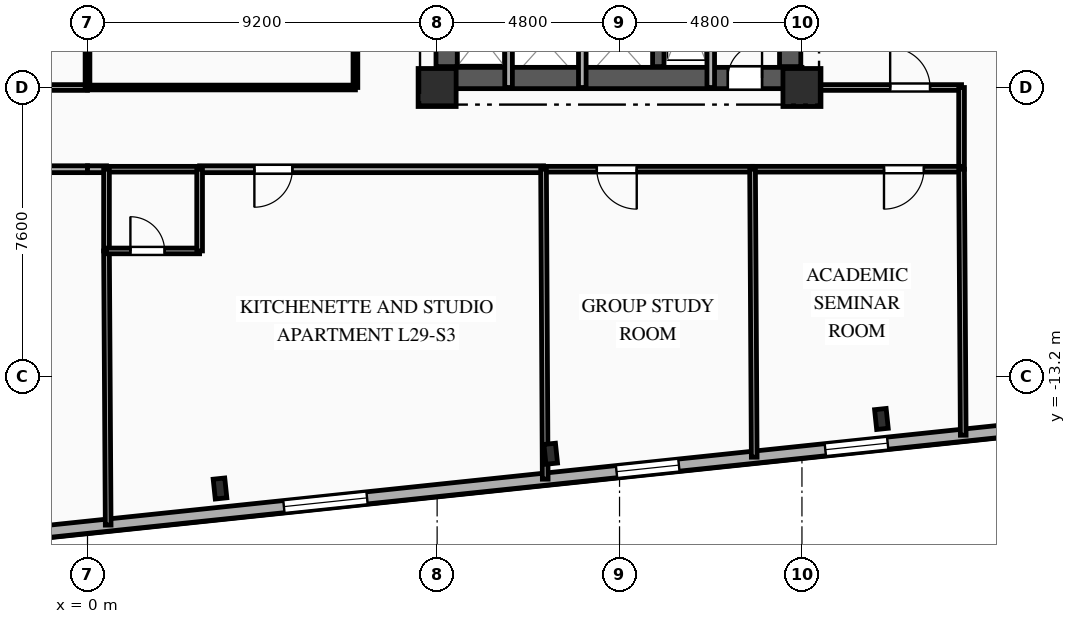
"""IFC4 building model, lengths in metres.
Left out: names, types, materials, properties, quantities, classifications, styles, units other than length and angle.
Written with IfcOpenShell. Run it as: python <this file> out.ifc"""

import sys

from ifc_helpers import new_model, si_unit, direction, frame, frame_2d, origin, origin_2d, place, context, subcontext, project, spatial, rectangle, i_section, extrude, element, fill, save


model = new_model("IFC4")
c1 = context("Model", 3, precision=1e-05, world=origin(), true_north=direction((0.0, 1.0)))
c2 = subcontext(c1, "Body", "Model", "MODEL_VIEW")
j1 = project(units=[si_unit("LENGTHUNIT", "METRE"), si_unit("PLANEANGLEUNIT", "RADIAN")], contexts=[c1])
p1 = place(None, origin())
s1 = spatial("IfcSite", under=j1, at=p1, CompositionType="ELEMENT")
p2 = place(p1, origin())
s2 = spatial("IfcBuilding", under=s1, at=p2, CompositionType="ELEMENT")
p3 = place(p2, frame((0.0, 0.0, 105.8)))
s3 = spatial("IfcBuildingStorey", under=s2, at=p3, CompositionType="ELEMENT", Elevation=105.8)
for number, where, z_axis, x_axis in (
    (1, (9.2, -5.6, 0.0), (0.0, 0.0, 1.0), (1.0, 0.0, 0.0)),
    (2, (18.8, -5.6, 0.0), (0.0, 0.0, 1.0), (1.0, 0.0, 0.0)),
):
    element("IfcColumn", number, at=place(p3, frame(where, z_axis=z_axis, x_axis=x_axis)), inside=s3, PredefinedType="COLUMN", context=c2, shape_type="SweptSolid", body=[
        extrude(rectangle(XDim=1.0, YDim=1.0, at=origin_2d()), origin(), (0.0, 0.0, 1.0), 3.35),
    ])
for number, where, z_axis, x_axis in (
    (3, (3.487, -16.151, 0.0), (0.0, 0.0, 1.0), (0.995, 0.105, 0.0)),
    (4, (12.189, -15.237, 0.0), (0.0, 0.0, 1.0), (0.995, 0.105, 0.0)),
    (5, (20.891, -14.322, 0.0), (0.0, 0.0, 1.0), (0.995, 0.105, 0.0)),
):
    element("IfcColumn", number, at=place(p3, frame(where, z_axis=z_axis, x_axis=x_axis)), inside=s3, PredefinedType="COLUMN", context=c2, shape_type="SweptSolid", body=[
        extrude(i_section(OverallWidth=0.306, OverallDepth=0.524, WebThickness=0.021, FlangeThickness=0.04, FilletRadius=0.027, at=origin_2d()), origin(), (0.0, 0.0, 1.0), 3.35),
    ])
p4 = place(p3, frame((30.307, -13.986, 0.0), z_axis=(0.0, 0.0, 1.0), x_axis=(-0.994521628355, -0.104531003701, 0.0)))
e6 = element("IfcWall", 6, at=p4, inside=s3, PredefinedType="SOLIDWALL", context=c2, shape_type="SweptSolid", body=[
    extrude(rectangle(XDim=53.8, YDim=0.32, at=frame_2d((26.9, 0.0))), origin(), (0.0, 0.0, 1.0), 3.045),
])
p5 = place(p4, frame((3.098, 0.0, 0.85)))
e7 = element("IfcOpeningElement", 7, at=p5, cuts=e6, PredefinedType="OPENING", context=c2, shape_type="SweptSolid", body=[
    extrude(rectangle(XDim=1.65, YDim=1.85, at=frame_2d((0.825, 0.925))), frame((0.0, 0.17, 0.0), z_axis=(0.0, -1.0, 0.0), x_axis=(1.0, 0.0, 0.0)), (0.0, 0.0, 1.0), 0.34),
])
p6 = place(p4, frame((9.302, 0.0, 0.85)))
e8 = element("IfcOpeningElement", 8, at=p6, cuts=e6, PredefinedType="OPENING", context=c2, shape_type="SweptSolid", body=[
    extrude(rectangle(XDim=1.65, YDim=1.85, at=frame_2d((0.825, 0.925))), frame((0.0, 0.17, 0.0), z_axis=(0.0, -1.0, 0.0), x_axis=(1.0, 0.0, 0.0)), (0.0, 0.0, 1.0), 0.34),
])
p7 = place(p4, frame((14.827, 0.0, 0.85)))
e9 = element("IfcOpeningElement", 9, at=p7, cuts=e6, PredefinedType="OPENING", context=c2, shape_type="SweptSolid", body=[
    extrude(rectangle(XDim=1.65, YDim=1.85, at=frame_2d((0.825, 0.925))), frame((0.0, 0.17, 0.0), z_axis=(0.0, -1.0, 0.0), x_axis=(1.0, 0.0, 0.0)), (0.0, 0.0, 1.0), 0.34),
])
p8 = place(p4, frame((23.078, 0.0, 0.85)))
e10 = element("IfcOpeningElement", 10, at=p8, cuts=e6, PredefinedType="OPENING", context=c2, shape_type="SweptSolid", body=[
    extrude(rectangle(XDim=2.2, YDim=1.85, at=frame_2d((1.1, 0.925))), frame((0.0, 0.17, 0.0), z_axis=(0.0, -1.0, 0.0), x_axis=(1.0, 0.0, 0.0)), (0.0, 0.0, 1.0), 0.34),
])
p9 = place(p4, frame((34.646, 0.0, 0.85)))
e11 = element("IfcOpeningElement", 11, at=p9, cuts=e6, PredefinedType="OPENING", context=c2, shape_type="SweptSolid", body=[
    extrude(rectangle(XDim=2.2, YDim=1.85, at=frame_2d((1.1, 0.925))), frame((0.0, 0.17, 0.0), z_axis=(0.0, -1.0, 0.0), x_axis=(1.0, 0.0, 0.0)), (0.0, 0.0, 1.0), 0.34),
])
p10 = place(p4, frame((43.728, 0.0, 0.85)))
e12 = element("IfcOpeningElement", 12, at=p10, cuts=e6, PredefinedType="OPENING", context=c2, shape_type="SweptSolid", body=[
    extrude(rectangle(XDim=1.65, YDim=1.85, at=frame_2d((0.825, 0.925))), frame((0.0, 0.17, 0.0), z_axis=(0.0, -1.0, 0.0), x_axis=(1.0, 0.0, 0.0)), (0.0, 0.0, 1.0), 0.34),
])
p11 = place(p4, frame((49.653, 0.0, 0.85)))
e13 = element("IfcOpeningElement", 13, at=p11, cuts=e6, PredefinedType="OPENING", context=c2, shape_type="SweptSolid", body=[
    extrude(rectangle(XDim=1.65, YDim=1.85, at=frame_2d((0.825, 0.925))), frame((0.0, 0.17, 0.0), z_axis=(0.0, -1.0, 0.0), x_axis=(1.0, 0.0, 0.0)), (0.0, 0.0, 1.0), 0.34),
])
p12 = place(p3, frame((9.2, -5.35, 0.0), z_axis=(0.0, 0.0, 1.0), x_axis=(1.0, 0.0, 0.0)))
e14 = element("IfcWall", 14, at=p12, inside=s3, PredefinedType="SHEAR", context=c2, shape_type="SweptSolid", body=[
    extrude(rectangle(XDim=9.6, YDim=0.56, at=frame_2d((4.8, 0.0))), origin(), (0.0, 0.0, 1.0), 3.045),
])
p13 = place(p12, frame((7.65, 0.0, 0.0)))
e15 = element("IfcOpeningElement", 15, at=p13, cuts=e14, PredefinedType="OPENING", context=c2, shape_type="SweptSolid", body=[
    extrude(rectangle(XDim=0.9, YDim=2.1, at=frame_2d((0.45, 1.05))), frame((0.0, 0.29, 0.0), z_axis=(0.0, -1.0, 0.0), x_axis=(1.0, 0.0, 0.0)), (0.0, 0.0, 1.0), 0.58),
])
p14 = place(p3, frame((9.45, -5.05, 0.0), z_axis=(0.0, 0.0, 1.0), x_axis=(0.0, 1.0, 0.0)))
e16 = element("IfcWall", 16, at=p14, inside=s3, PredefinedType="SHEAR", context=c2, shape_type="SweptSolid", body=[
    extrude(rectangle(XDim=10.1, YDim=0.56, at=frame_2d((5.05, 0.0))), origin(), (0.0, 0.0, 1.0), 3.045),
])
p15 = place(p14, frame((7.15, 0.0, 0.0)))
e17 = element("IfcOpeningElement", 17, at=p15, cuts=e16, PredefinedType="OPENING", context=c2, shape_type="SweptSolid", body=[
    extrude(rectangle(XDim=0.9, YDim=2.1, at=frame_2d((0.45, 1.05))), frame((0.0, 0.29, 0.0), z_axis=(0.0, -1.0, 0.0), x_axis=(1.0, 0.0, 0.0)), (0.0, 0.0, 1.0), 0.58),
])
p16 = place(p14, frame((2.4, 0.0, 0.0)))
e18 = element("IfcOpeningElement", 18, at=p16, cuts=e16, PredefinedType="OPENING", context=c2, shape_type="SweptSolid", body=[
    extrude(rectangle(XDim=1.2, YDim=2.15, at=frame_2d((0.6, 1.075))), frame((0.0, 0.29, 0.0), z_axis=(0.0, -1.0, 0.0), x_axis=(1.0, 0.0, 0.0)), (0.0, 0.0, 1.0), 0.58),
])
p17 = place(p3, frame((18.49, -5.05, 0.0), z_axis=(0.0, 0.0, 1.0), x_axis=(0.0, 1.0, 0.0)))
e19 = element("IfcWall", 19, at=p17, inside=s3, PredefinedType="SHEAR", context=c2, shape_type="SweptSolid", body=[
    extrude(rectangle(XDim=10.1, YDim=0.56, at=frame_2d((5.05, 0.0))), origin(), (0.0, 0.0, 1.0), 3.045),
])
p18 = place(p3, frame((15.02, -5.05, 0.0), z_axis=(0.0, 0.0, 1.0), x_axis=(0.0, 1.0, 0.0)))
e20 = element("IfcWall", 20, at=p18, inside=s3, PredefinedType="SHEAR", context=c2, shape_type="SweptSolid", body=[
    extrude(rectangle(XDim=10.1, YDim=0.3, at=frame_2d((5.05, 0.0))), origin(), (0.0, 0.0, 1.0), 3.045),
])
p19 = place(p3, frame((16.4, -2.11, 0.0), z_axis=(0.0, 0.0, 1.0), x_axis=(0.0, -1.0, 0.0)))
e21 = element("IfcWall", 21, at=p19, inside=s3, PredefinedType="PARTITIONING", context=c2, shape_type="SweptSolid", body=[
    extrude(rectangle(XDim=3.49, YDim=0.2, at=frame_2d((1.745, 0.0))), origin(), (0.0, 0.0, 1.0), 3.045),
])
for number, where, z_axis, x_axis in (
    (22, (11.08, -5.6, 0.0), (0.0, 0.0, 1.0), (0.0, 1.0, 0.0)),
    (23, (13.02, -5.6, 0.0), (0.0, 0.0, 1.0), (0.0, 1.0, 0.0)),
):
    element("IfcWall", number, at=place(p3, frame(where, z_axis=z_axis, x_axis=x_axis)), inside=s3, PredefinedType="PARTITIONING", context=c2, shape_type="SweptSolid", body=[
        extrude(rectangle(XDim=2.25, YDim=0.2, at=frame_2d((1.125, 0.0))), origin(), (0.0, 0.0, 1.0), 3.045),
    ])
p20 = place(p3, frame((0.0, -7.75, 0.0), z_axis=(0.0, 0.0, 1.0), x_axis=(-1.0, 0.0, 0.0)))
e24 = element("IfcWall", 24, at=p20, inside=s3, PredefinedType="PARTITIONING", context=c2, shape_type="SweptSolid", body=[
    extrude(rectangle(XDim=8.55, YDim=0.18, at=frame_2d((4.275, 0.0))), origin(), (0.0, 0.0, 1.0), 3.045),
])
p21 = place(p20, frame((1.379, 0.0, 0.0)))
e25 = element("IfcOpeningElement", 25, at=p21, cuts=e24, PredefinedType="OPENING", context=c2, shape_type="SweptSolid", body=[
    extrude(rectangle(XDim=1.0, YDim=2.15, at=frame_2d((0.5, 1.075))), frame((0.0, 0.1, 0.0), z_axis=(0.0, -1.0, 0.0), x_axis=(1.0, 0.0, 0.0)), (0.0, 0.0, 1.0), 0.2),
])
p22 = place(p3, frame((-7.05, -5.6, 0.0), z_axis=(0.0, 0.0, 1.0), x_axis=(1.0, 0.0, 0.0)))
e26 = element("IfcWall", 26, at=p22, inside=s3, PredefinedType="PARTITIONING", context=c2, shape_type="SweptSolid", body=[
    extrude(rectangle(XDim=7.05, YDim=0.15, at=frame_2d((3.525, 0.0))), origin(), (0.0, 0.0, 1.0), 2.53),
])
p23 = place(p3, frame((18.8, -5.6, 0.0), z_axis=(0.0, 0.0, 1.0), x_axis=(1.0, 0.0, 0.0)))
e27 = element("IfcWall", 27, at=p23, inside=s3, PredefinedType="PARTITIONING", context=c2, shape_type="SweptSolid", body=[
    extrude(rectangle(XDim=4.2, YDim=0.15, at=frame_2d((2.1, 0.0))), origin(), (0.0, 0.0, 1.0), 2.53),
])
p24 = place(p23, frame((2.321, 0.0, 0.0)))
e28 = element("IfcOpeningElement", 28, at=p24, cuts=e27, PredefinedType="OPENING", context=c2, shape_type="SweptSolid", body=[
    extrude(rectangle(XDim=1.05, YDim=2.15, at=frame_2d((0.525, 1.075))), frame((0.0, 0.085, 0.0), z_axis=(0.0, -1.0, 0.0), x_axis=(1.0, 0.0, 0.0)), (0.0, 0.0, 1.0), 0.17),
])
p25 = place(p3, frame((23.0, -5.6, 0.0), z_axis=(0.0, 0.0, 1.0), x_axis=(0.0, -1.0, 0.0)))
e29 = element("IfcWall", 29, at=p25, inside=s3, PredefinedType="PARTITIONING", context=c2, shape_type="SweptSolid", body=[
    extrude(rectangle(XDim=2.15, YDim=0.15, at=frame_2d((1.075, 0.0))), origin(), (0.0, 0.0, 1.0), 3.045),
])
p26 = place(p3, frame((0.5, -7.75, 0.0), z_axis=(0.0, 0.0, 1.0), x_axis=(-1.0, 0.0, 0.0)))
e30 = element("IfcWall", 30, at=p26, inside=s3, PredefinedType="PARTITIONING", context=c2, shape_type="SweptSolid", body=[
    extrude(rectangle(XDim=0.5, YDim=0.18, at=frame_2d((0.25, 0.0))), origin(), (0.0, 0.0, 1.0), 3.045),
])
p27 = place(p3, frame((12.0, -7.75, 0.0), z_axis=(0.0, 0.0, 1.0), x_axis=(-1.0, 0.0, 0.0)))
e31 = element("IfcWall", 31, at=p27, inside=s3, PredefinedType="PARTITIONING", context=c2, shape_type="SweptSolid", body=[
    extrude(rectangle(XDim=9.05, YDim=0.18, at=frame_2d((4.525, 0.0))), origin(), (0.0, 0.0, 1.0), 3.045),
])
p28 = place(p27, frame((6.609, 0.0, 0.0)))
e32 = element("IfcOpeningElement", 32, at=p28, cuts=e31, PredefinedType="OPENING", context=c2, shape_type="SweptSolid", body=[
    extrude(rectangle(XDim=1.0, YDim=2.15, at=frame_2d((0.5, 1.075))), frame((0.0, 0.1, 0.0), z_axis=(0.0, -1.0, 0.0), x_axis=(1.0, 0.0, 0.0)), (0.0, 0.0, 1.0), 0.2),
])
p29 = place(p3, frame((2.95, -7.75, 0.0), z_axis=(0.0, 0.0, 1.0), x_axis=(-1.0, 0.0, 0.0)))
e33 = element("IfcWall", 33, at=p29, inside=s3, PredefinedType="PLUMBINGWALL", context=c2, shape_type="SweptSolid", body=[
    extrude(rectangle(XDim=2.45, YDim=0.15, at=frame_2d((1.225, 0.0))), origin(), (0.0, 0.0, 1.0), 3.045),
])
p30 = place(p3, frame((17.5, -7.75, 0.0), z_axis=(0.0, 0.0, 1.0), x_axis=(-1.0, 0.0, 0.0)))
e34 = element("IfcWall", 34, at=p30, inside=s3, PredefinedType="PARTITIONING", context=c2, shape_type="SweptSolid", body=[
    extrude(rectangle(XDim=5.5, YDim=0.15, at=frame_2d((2.75, 0.0))), origin(), (0.0, 0.0, 1.0), 3.045),
])
p31 = place(p30, frame((3.048, 0.0, 0.0)))
e35 = element("IfcOpeningElement", 35, at=p31, cuts=e34, PredefinedType="OPENING", context=c2, shape_type="SweptSolid", body=[
    extrude(rectangle(XDim=1.05, YDim=2.15, at=frame_2d((0.525, 1.075))), frame((0.0, 0.085, 0.0), z_axis=(0.0, -1.0, 0.0), x_axis=(1.0, 0.0, 0.0)), (0.0, 0.0, 1.0), 0.17),
])
p32 = place(p3, frame((23.0, -7.75, 0.0), z_axis=(0.0, 0.0, 1.0), x_axis=(-1.0, 0.0, 0.0)))
e36 = element("IfcWall", 36, at=p32, inside=s3, PredefinedType="PARTITIONING", context=c2, shape_type="SweptSolid", body=[
    extrude(rectangle(XDim=5.5, YDim=0.15, at=frame_2d((2.75, 0.0))), origin(), (0.0, 0.0, 1.0), 3.045),
])
p33 = place(p32, frame((0.991, 0.0, 0.0)))
e37 = element("IfcOpeningElement", 37, at=p33, cuts=e36, PredefinedType="OPENING", context=c2, shape_type="SweptSolid", body=[
    extrude(rectangle(XDim=1.05, YDim=2.15, at=frame_2d((0.525, 1.075))), frame((0.0, 0.085, 0.0), z_axis=(0.0, -1.0, 0.0), x_axis=(1.0, 0.0, 0.0)), (0.0, 0.0, 1.0), 0.17),
])
p34 = place(p3, frame((0.0, -5.6, 0.0), z_axis=(0.0, 0.0, 1.0), x_axis=(1.0, 0.0, 0.0)))
e38 = element("IfcWall", 38, at=p34, inside=s3, PredefinedType="PARTITIONING", context=c2, shape_type="SweptSolid", body=[
    extrude(rectangle(XDim=7.05, YDim=0.125, at=frame_2d((3.525, 0.0))), origin(), (0.0, 0.0, 1.0), 2.53),
])
p35 = place(p3, frame((7.05, -5.6, 0.0), z_axis=(0.0, 0.0, 1.0), x_axis=(0.0, 1.0, 0.0)))
e39 = element("IfcWall", 39, at=p35, inside=s3, PredefinedType="PARTITIONING", context=c2, shape_type="SweptSolid", body=[
    extrude(rectangle(XDim=14.1, YDim=0.125, at=frame_2d((7.05, 0.0))), origin(), (0.0, 0.0, 1.0), 3.045),
])
p36 = place(p35, frame((5.076, 0.0, 0.0)))
e40 = element("IfcOpeningElement", 40, at=p36, cuts=e39, PredefinedType="OPENING", context=c2, shape_type="SweptSolid", body=[
    extrude(rectangle(XDim=0.95, YDim=2.1, at=frame_2d((0.475, 1.05))), frame((0.0, 0.073, 0.0), z_axis=(0.0, -1.0, 0.0), x_axis=(1.0, 0.0, 0.0)), (0.0, 0.0, 1.0), 0.145),
])
p37 = place(p3, frame((23.044, -14.749, 0.0), z_axis=(0.0, 0.0, 1.0), x_axis=(-0.006278653971, 0.999980289058, 0.0)))
e41 = element("IfcWall", 41, at=p37, inside=s3, PredefinedType="PARTITIONING", context=c2, shape_type="SweptSolid", body=[
    extrude(rectangle(XDim=6.999, YDim=0.15, at=frame_2d((3.5, 0.0))), origin(), (0.0, 0.0, 1.0), 3.045),
])
p38 = place(p3, frame((0.5, -9.9, 0.0), z_axis=(0.0, 0.0, 1.0), x_axis=(0.006091463685, -0.999981446863, 0.0)))
e42 = element("IfcWall", 42, at=p38, inside=s3, PredefinedType="PARTITIONING", context=c2, shape_type="SweptSolid", body=[
    extrude(rectangle(XDim=7.214, YDim=0.15, at=frame_2d((3.607, 0.0))), origin(), (0.0, 0.0, 1.0), 3.045),
])
p39 = place(p3, frame((0.5, -7.75, 0.0), z_axis=(0.0, 0.0, 1.0), x_axis=(0.0, -1.0, 0.0)))
e43 = element("IfcWall", 43, at=p39, inside=s3, PredefinedType="PLUMBINGWALL", context=c2, shape_type="SweptSolid", body=[
    extrude(rectangle(XDim=2.15, YDim=0.15, at=frame_2d((1.075, 0.0))), origin(), (0.0, 0.0, 1.0), 3.045),
])
p40 = place(p3, frame((0.5, -9.9, 0.0), z_axis=(0.0, 0.0, 1.0), x_axis=(1.0, 0.0, 0.0)))
e44 = element("IfcWall", 44, at=p40, inside=s3, PredefinedType="PLUMBINGWALL", context=c2, shape_type="SweptSolid", body=[
    extrude(rectangle(XDim=2.45, YDim=0.15, at=frame_2d((1.225, 0.0))), origin(), (0.0, 0.0, 1.0), 3.045),
])
p41 = place(p40, frame((0.629, 0.0, 0.0)))
e45 = element("IfcOpeningElement", 45, at=p41, cuts=e44, PredefinedType="OPENING", context=c2, shape_type="SweptSolid", body=[
    extrude(rectangle(XDim=0.9, YDim=2.1, at=frame_2d((0.45, 1.05))), frame((0.0, 0.085, 0.0), z_axis=(0.0, -1.0, 0.0), x_axis=(1.0, 0.0, 0.0)), (0.0, 0.0, 1.0), 0.17),
])
p42 = place(p3, frame((2.95, -9.9, 0.0), z_axis=(0.0, 0.0, 1.0), x_axis=(0.0, 1.0, 0.0)))
e46 = element("IfcWall", 46, at=p42, inside=s3, PredefinedType="PLUMBINGWALL", context=c2, shape_type="SweptSolid", body=[
    extrude(rectangle(XDim=2.15, YDim=0.15, at=frame_2d((1.075, 0.0))), origin(), (0.0, 0.0, 1.0), 3.045),
])
p43 = place(p3, frame((12.0, -7.75, 0.0), z_axis=(0.0, 0.0, 1.0), x_axis=(0.005388497987, -0.999985481939, 0.0)))
e47 = element("IfcWall", 47, at=p43, inside=s3, PredefinedType="PARTITIONING", context=c2, shape_type="SweptSolid", body=[
    extrude(rectangle(XDim=8.155, YDim=0.15, at=frame_2d((4.078, 0.0))), origin(), (0.0, 0.0, 1.0), 2.53),
])
p44 = place(p3, frame((17.5, -7.75, 0.0), z_axis=(0.0, 0.0, 1.0), x_axis=(0.005799618919, -0.999983182069, 0.0)))
e48 = element("IfcWall", 48, at=p44, inside=s3, PredefinedType="PARTITIONING", context=c2, shape_type="SweptSolid", body=[
    extrude(rectangle(XDim=7.577, YDim=0.15, at=frame_2d((3.789, 0.0))), origin(), (0.0, 0.0, 1.0), 3.045),
])
p45 = place(p3, frame((0.0, 8.5, 0.0), z_axis=(0.0, 0.0, 1.0), x_axis=(0.0, -1.0, 0.0)))
e49 = element("IfcWall", 49, at=p45, inside=s3, PredefinedType="PARTITIONING", context=c2, shape_type="SweptSolid", body=[
    extrude(rectangle(XDim=14.1, YDim=0.125, at=frame_2d((7.05, 0.0))), origin(), (0.0, 0.0, 1.0), 3.045),
])
p46 = place(p6, origin())
e50 = element("IfcWindow", 50, at=p46, inside=s3, PartitioningType="SINGLE_PANEL", PredefinedType="WINDOW", context=c2, shape_type="SweptSolid", body=[
    extrude(rectangle(XDim=1.65, YDim=1.85, at=frame_2d((0.825, 0.925))), frame((0.0, 0.03, 0.0), z_axis=(0.0, -1.0, 0.0), x_axis=(1.0, 0.0, 0.0)), (0.0, 0.0, 1.0), 0.06),
])
fill(e8, e50)
p47 = place(p7, origin())
e51 = element("IfcWindow", 51, at=p47, inside=s3, PartitioningType="SINGLE_PANEL", PredefinedType="WINDOW", context=c2, shape_type="SweptSolid", body=[
    extrude(rectangle(XDim=1.65, YDim=1.85, at=frame_2d((0.825, 0.925))), frame((0.0, 0.03, 0.0), z_axis=(0.0, -1.0, 0.0), x_axis=(1.0, 0.0, 0.0)), (0.0, 0.0, 1.0), 0.06),
])
fill(e9, e51)
p48 = place(p8, origin())
e52 = element("IfcWindow", 52, at=p48, inside=s3, PartitioningType="SINGLE_PANEL", PredefinedType="WINDOW", context=c2, shape_type="SweptSolid", body=[
    extrude(rectangle(XDim=2.2, YDim=1.85, at=frame_2d((1.1, 0.925))), frame((0.0, 0.03, 0.0), z_axis=(0.0, -1.0, 0.0), x_axis=(1.0, 0.0, 0.0)), (0.0, 0.0, 1.0), 0.06),
])
fill(e10, e52)
p49 = place(p13, origin())
e53 = element("IfcDoor", 53, at=p49, inside=s3, OperationType="SINGLE_SWING_RIGHT", PredefinedType="DOOR", context=c2, shape_type="SweptSolid", body=[
    extrude(rectangle(XDim=0.9, YDim=2.1, at=frame_2d((0.45, 1.05))), frame((0.0, 0.025, 0.0), z_axis=(0.0, -1.0, 0.0), x_axis=(1.0, 0.0, 0.0)), (0.0, 0.0, 1.0), 0.05),
])
fill(e15, e53)
p50 = place(p24, origin())
e54 = element("IfcDoor", 54, at=p50, inside=s3, OperationType="SINGLE_SWING_LEFT", PredefinedType="DOOR", context=c2, shape_type="SweptSolid", body=[
    extrude(rectangle(XDim=1.05, YDim=2.15, at=frame_2d((0.525, 1.075))), frame((0.0, 0.025, 0.0), z_axis=(0.0, -1.0, 0.0), x_axis=(1.0, 0.0, 0.0)), (0.0, 0.0, 1.0), 0.05),
])
fill(e28, e54)
p51 = place(p28, origin())
e55 = element("IfcDoor", 55, at=p51, inside=s3, OperationType="SINGLE_SWING_RIGHT", PredefinedType="DOOR", context=c2, shape_type="SweptSolid", body=[
    extrude(rectangle(XDim=1.0, YDim=2.15, at=frame_2d((0.5, 1.075))), frame((0.0, 0.025, 0.0), z_axis=(0.0, -1.0, 0.0), x_axis=(1.0, 0.0, 0.0)), (0.0, 0.0, 1.0), 0.05),
])
fill(e32, e55)
p52 = place(p31, origin())
e56 = element("IfcDoor", 56, at=p52, inside=s3, OperationType="SINGLE_SWING_LEFT", PredefinedType="DOOR", context=c2, shape_type="SweptSolid", body=[
    extrude(rectangle(XDim=1.05, YDim=2.15, at=frame_2d((0.525, 1.075))), frame((0.0, 0.025, 0.0), z_axis=(0.0, -1.0, 0.0), x_axis=(1.0, 0.0, 0.0)), (0.0, 0.0, 1.0), 0.05),
])
fill(e35, e56)
p53 = place(p33, origin())
e57 = element("IfcDoor", 57, at=p53, inside=s3, OperationType="SINGLE_SWING_RIGHT", PredefinedType="DOOR", context=c2, shape_type="SweptSolid", body=[
    extrude(rectangle(XDim=1.05, YDim=2.15, at=frame_2d((0.525, 1.075))), frame((0.0, 0.025, 0.0), z_axis=(0.0, -1.0, 0.0), x_axis=(1.0, 0.0, 0.0)), (0.0, 0.0, 1.0), 0.05),
])
fill(e37, e57)
p54 = place(p41, origin())
e58 = element("IfcDoor", 58, at=p54, inside=s3, OperationType="SINGLE_SWING_LEFT", PredefinedType="DOOR", context=c2, shape_type="SweptSolid", body=[
    extrude(rectangle(XDim=0.9, YDim=2.1, at=frame_2d((0.45, 1.05))), frame((0.0, 0.025, 0.0), z_axis=(0.0, -1.0, 0.0), x_axis=(1.0, 0.0, 0.0)), (0.0, 0.0, 1.0), 0.05),
])
fill(e45, e58)
save(model, sys.argv[1])
